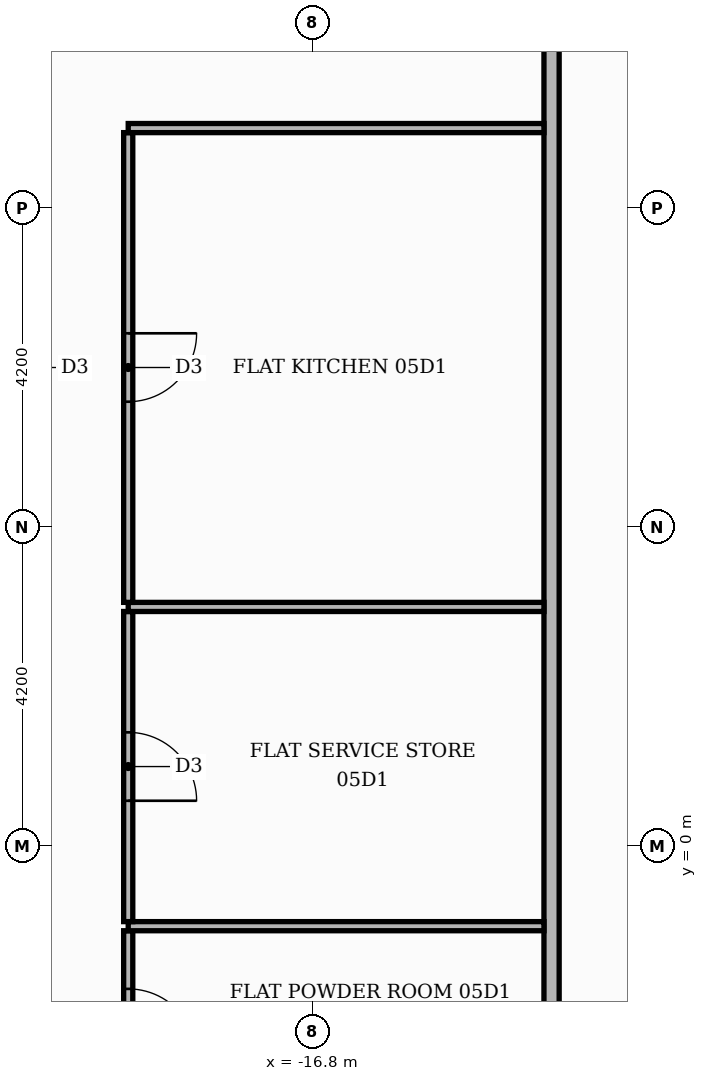
"""IFC4 building model, lengths in metres.
Left out: names, types, materials, properties, quantities, classifications, styles, units other than length and angle.
Written with IfcOpenShell. Run it as: python <this file> out.ifc"""

import sys

from ifc_helpers import new_model, si_unit, direction, frame, frame_2d, origin, place, context, subcontext, project, spatial, rectangle, extrude, element, fill, save


model = new_model("IFC4")
c1 = context("Model", 3, precision=1e-05, world=origin(), true_north=direction((0.0, 1.0)))
c2 = subcontext(c1, "Body", "Model", "MODEL_VIEW")
j1 = project(units=[si_unit("LENGTHUNIT", "METRE"), si_unit("PLANEANGLEUNIT", "RADIAN")], contexts=[c1])
p1 = place(None, origin())
s1 = spatial("IfcSite", under=j1, at=p1, CompositionType="ELEMENT")
p2 = place(p1, origin())
s2 = spatial("IfcBuilding", under=s1, at=p2, CompositionType="ELEMENT")
p3 = place(p2, frame((0.0, 0.0, 27.0)))
s3 = spatial("IfcBuildingStorey", under=s2, at=p3, CompositionType="ELEMENT", Elevation=27.0)
p4 = place(p3, frame((-13.65, -13.55, 0.0), z_axis=(0.0, 0.0, 1.0), x_axis=(0.0, 1.0, 0.0)))
e1 = element("IfcWall", 1, at=p4, inside=s3, PredefinedType="PARTITIONING", context=c2, shape_type="SweptSolid", body=[
    extrude(rectangle(XDim=27.1, YDim=0.2, at=frame_2d((13.55, 0.0))), origin(), (0.0, 0.0, 1.0), 3.48),
])
p5 = place(p4, frame((24.55, 0.0, 0.0)))
e2 = element("IfcOpeningElement", 2, at=p5, cuts=e1, PredefinedType="OPENING", context=c2, shape_type="SweptSolid", body=[
    extrude(rectangle(XDim=1.1, YDim=2.4, at=frame_2d((0.55, 1.2))), frame((0.0, 0.11, 0.0), z_axis=(0.0, -1.0, 0.0), x_axis=(1.0, 0.0, 0.0)), (0.0, 0.0, 1.0), 0.22),
])
p6 = place(p3, frame((-19.22, -3.54, 0.0), z_axis=(0.0, 0.0, 1.0), x_axis=(0.0, 1.0, 0.0)))
e3 = element("IfcWall", 3, at=p6, inside=s3, PredefinedType="PARTITIONING", context=c2, shape_type="SweptSolid", body=[
    extrude(rectangle(XDim=2.43, YDim=0.12, at=frame_2d((1.215, 0.0))), origin(), (0.0, 0.0, 1.0), 3.48),
])
p7 = place(p6, frame((0.765, 0.0, 0.0)))
e4 = element("IfcOpeningElement", 4, at=p7, cuts=e3, PredefinedType="OPENING", context=c2, shape_type="SweptSolid", body=[
    extrude(rectangle(XDim=0.9, YDim=2.1, at=frame_2d((0.45, 1.05))), frame((0.0, 0.07, 0.0), z_axis=(0.0, -1.0, 0.0), x_axis=(1.0, 0.0, 0.0)), (0.0, 0.0, 1.0), 0.14),
])
p8 = place(p3, frame((-19.22, -1.05, 0.0), z_axis=(0.0, 0.0, 1.0), x_axis=(1.0, 0.0, 0.0)))
e5 = element("IfcWall", 5, at=p8, inside=s3, PredefinedType="PARTITIONING", context=c2, shape_type="SweptSolid", body=[
    extrude(rectangle(XDim=5.47, YDim=0.12, at=frame_2d((2.735, 0.0))), origin(), (0.0, 0.0, 1.0), 3.48),
])
p9 = place(p3, frame((-19.22, -0.99, 0.0), z_axis=(0.0, 0.0, 1.0), x_axis=(0.0, 1.0, 0.0)))
e6 = element("IfcWall", 6, at=p9, inside=s3, PredefinedType="PARTITIONING", context=c2, shape_type="SweptSolid", body=[
    extrude(rectangle(XDim=4.08, YDim=0.12, at=frame_2d((2.04, 0.0))), origin(), (0.0, 0.0, 1.0), 3.48),
])
p10 = place(p9, frame((1.59, 0.0, 0.0)))
e7 = element("IfcOpeningElement", 7, at=p10, cuts=e6, PredefinedType="OPENING", context=c2, shape_type="SweptSolid", body=[
    extrude(rectangle(XDim=0.9, YDim=2.1, at=frame_2d((0.45, 1.05))), frame((0.0, 0.07, 0.0), z_axis=(0.0, -1.0, 0.0), x_axis=(1.0, 0.0, 0.0)), (0.0, 0.0, 1.0), 0.14),
])
p11 = place(p3, frame((-19.22, 3.15, 0.0), z_axis=(0.0, 0.0, 1.0), x_axis=(1.0, 0.0, 0.0)))
e8 = element("IfcWall", 8, at=p11, inside=s3, PredefinedType="PARTITIONING", context=c2, shape_type="SweptSolid", body=[
    extrude(rectangle(XDim=5.47, YDim=0.12, at=frame_2d((2.735, 0.0))), origin(), (0.0, 0.0, 1.0), 3.48),
])
p12 = place(p3, frame((-19.22, 3.21, 0.0), z_axis=(0.0, 0.0, 1.0), x_axis=(0.0, 1.0, 0.0)))
e9 = element("IfcWall", 9, at=p12, inside=s3, PredefinedType="PARTITIONING", context=c2, shape_type="SweptSolid", body=[
    extrude(rectangle(XDim=6.18, YDim=0.12, at=frame_2d((3.09, 0.0))), origin(), (0.0, 0.0, 1.0), 3.48),
])
p13 = place(p12, frame((2.64, 0.0, 0.0)))
e10 = element("IfcOpeningElement", 10, at=p13, cuts=e9, PredefinedType="OPENING", context=c2, shape_type="SweptSolid", body=[
    extrude(rectangle(XDim=0.9, YDim=2.1, at=frame_2d((0.45, 1.05))), frame((0.0, 0.07, 0.0), z_axis=(0.0, -1.0, 0.0), x_axis=(1.0, 0.0, 0.0)), (0.0, 0.0, 1.0), 0.14),
])
p14 = place(p3, frame((-19.22, 9.45, 0.0), z_axis=(0.0, 0.0, 1.0), x_axis=(1.0, 0.0, 0.0)))
e11 = element("IfcWall", 11, at=p14, inside=s3, PredefinedType="PARTITIONING", context=c2, shape_type="SweptSolid", body=[
    extrude(rectangle(XDim=5.47, YDim=0.12, at=frame_2d((2.735, 0.0))), origin(), (0.0, 0.0, 1.0), 3.48),
])
p15 = place(p13, frame((0.9, 0.0, 0.0), z_axis=(0.0, 0.0, 1.0), x_axis=(-1.0, 0.0, 0.0)))
e12 = element("IfcDoor", 12, at=p15, inside=s3, OperationType="SINGLE_SWING_RIGHT", PredefinedType="DOOR", context=c2, shape_type="SweptSolid", body=[
    extrude(rectangle(XDim=0.9, YDim=2.1, at=frame_2d((0.45, 1.05))), frame((0.0, 0.025, 0.0), z_axis=(0.0, -1.0, 0.0), x_axis=(1.0, 0.0, 0.0)), (0.0, 0.0, 1.0), 0.05),
])
fill(e10, e12)
p16 = place(p10, frame((0.9, 0.0, 0.0), z_axis=(0.0, 0.0, 1.0), x_axis=(-1.0, 0.0, 0.0)))
e13 = element("IfcDoor", 13, at=p16, inside=s3, OperationType="SINGLE_SWING_LEFT", PredefinedType="DOOR", context=c2, shape_type="SweptSolid", body=[
    extrude(rectangle(XDim=0.9, YDim=2.1, at=frame_2d((0.45, 1.05))), frame((0.0, 0.025, 0.0), z_axis=(0.0, -1.0, 0.0), x_axis=(1.0, 0.0, 0.0)), (0.0, 0.0, 1.0), 0.05),
])
fill(e7, e13)
p17 = place(p7, frame((0.9, 0.0, 0.0), z_axis=(0.0, 0.0, 1.0), x_axis=(-1.0, 0.0, 0.0)))
e14 = element("IfcDoor", 14, at=p17, inside=s3, OperationType="SINGLE_SWING_LEFT", PredefinedType="DOOR", context=c2, shape_type="SweptSolid", body=[
    extrude(rectangle(XDim=0.9, YDim=2.1, at=frame_2d((0.45, 1.05))), frame((0.0, 0.025, 0.0), z_axis=(0.0, -1.0, 0.0), x_axis=(1.0, 0.0, 0.0)), (0.0, 0.0, 1.0), 0.05),
])
fill(e4, e14)
save(model, sys.argv[1])
